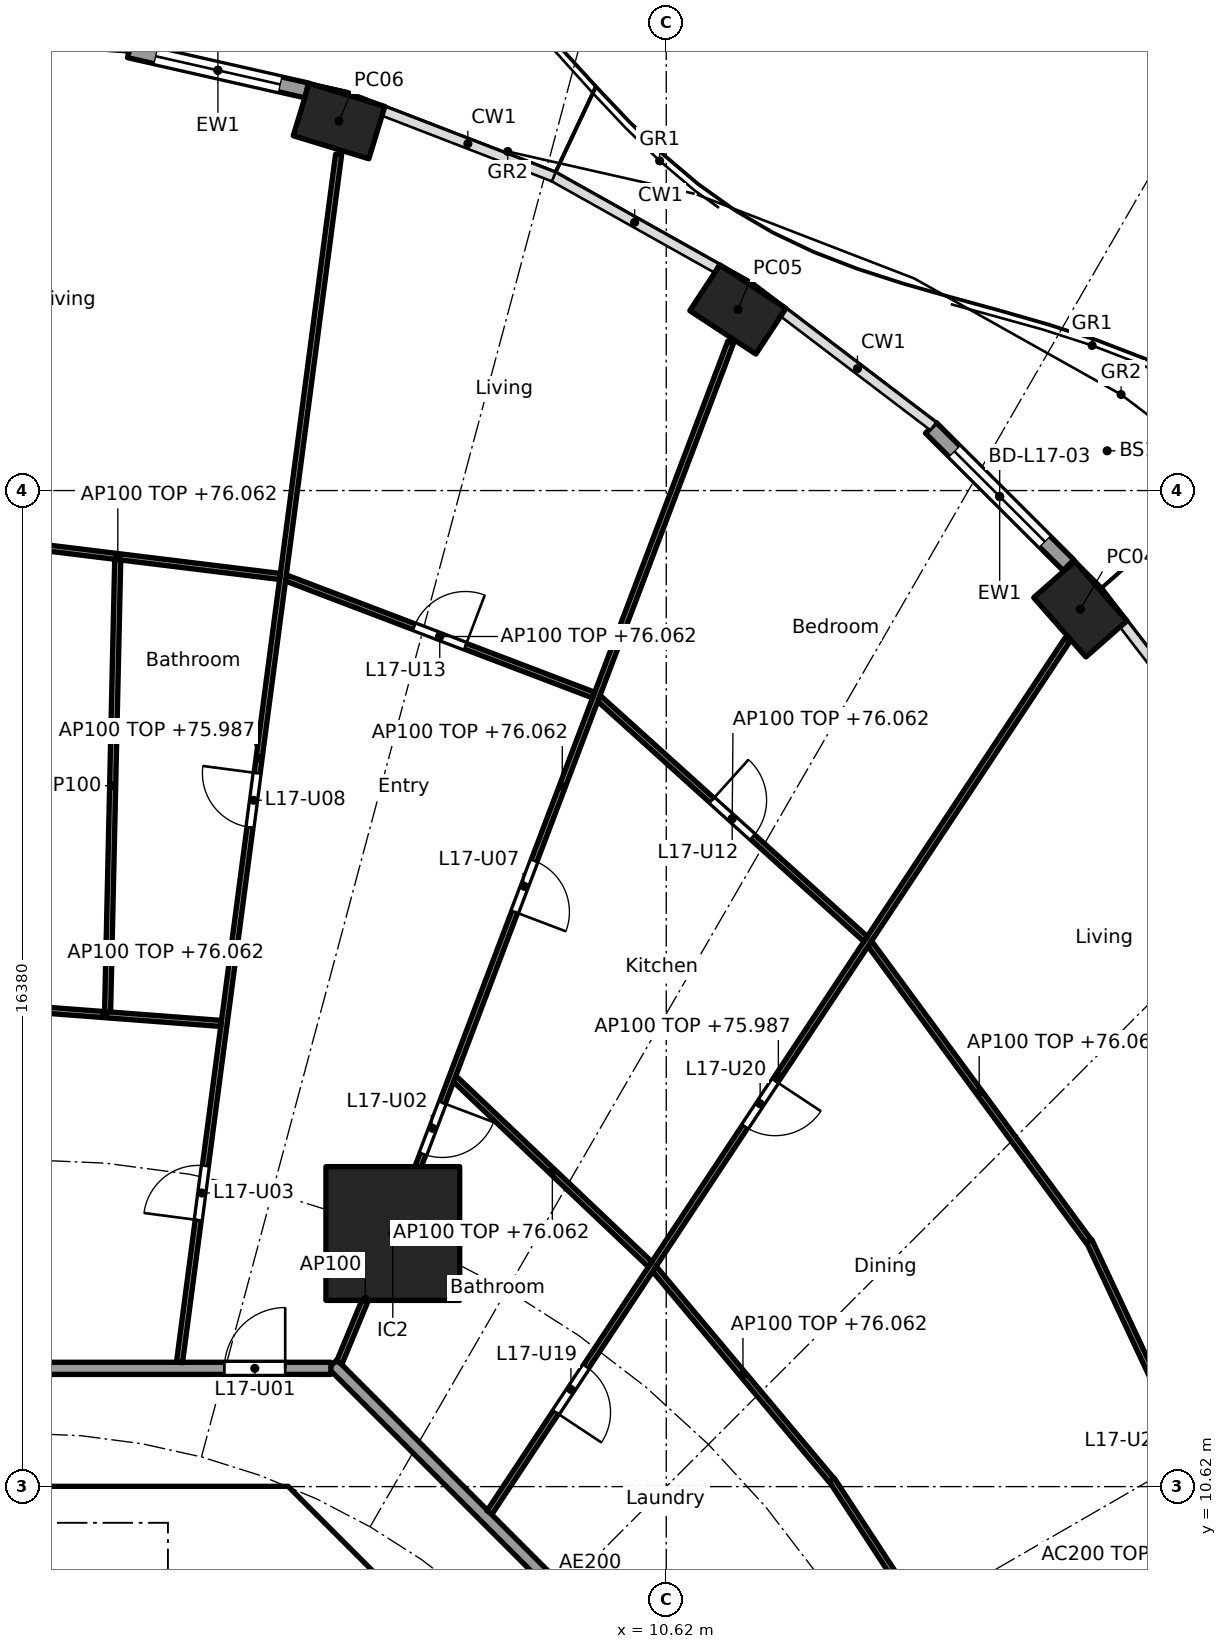
"""IFC4 building model, lengths in metres.
Left out: names, types, materials, properties, quantities, classifications, styles, units other than length and angle.
Written with IfcOpenShell. Run it as: python <this file> out.ifc"""

import sys

from ifc_helpers import new_model, si_unit, direction, frame, frame_2d, origin, origin_2d, place, context, subcontext, project, spatial, polyline, rectangle, hollow_rectangle, outline, extrude, element, fill, save


model = new_model("IFC4")
c1 = context("Model", 3, precision=1e-05, world=origin(), true_north=direction((0.0, 1.0)))
c2 = subcontext(c1, "Body", "Model", "MODEL_VIEW")
j1 = project(units=[si_unit("LENGTHUNIT", "METRE"), si_unit("PLANEANGLEUNIT", "RADIAN")], contexts=[c1])
p1 = place(None, origin())
s1 = spatial("IfcSite", under=j1, at=p1, CompositionType="ELEMENT")
p2 = place(p1, origin())
s2 = spatial("IfcBuilding", under=s1, at=p2, CompositionType="ELEMENT")
p3 = place(p2, frame((0.0, 0.0, 73.3)))
s3 = spatial("IfcBuildingStorey", under=s2, at=p3, CompositionType="ELEMENT", Elevation=73.3)
for number, where, z_axis, x_axis in (
    (1, (17.43, 25.049, -0.26), (0.0, 0.0, 1.0), (-0.66, 0.751, 0.0)),
    (2, (11.798, 29.978, -0.26), (0.0, 0.0, 1.0), (-0.836, 0.549, 0.0)),
    (3, (5.239, 33.076, -0.26), (0.0, 0.0, 1.0), (-0.957, 0.292, 0.0)),
):
    element("IfcColumn", number, at=place(p3, frame(where, z_axis=z_axis, x_axis=x_axis)), inside=s3, PredefinedType="COLUMN", context=c2, shape_type="SweptSolid", body=[
        extrude(hollow_rectangle(XDim=1.3, YDim=0.9, WallThickness=0.045, at=origin_2d()), origin(), (0.0, 0.0, 1.0), 3.96),
    ])
p4 = place(p3, frame((6.123, 14.782, 0.0), z_axis=(0.0, 0.0, 1.0), x_axis=(1.0, 0.0, 0.0)))
e4 = element("IfcColumn", 4, at=p4, inside=s3, PredefinedType="COLUMN", context=c2, shape_type="SweptSolid", body=[
    extrude(rectangle(XDim=2.2, YDim=2.2, at=origin_2d()), origin(), (0.0, 0.0, 1.0), 3.7),
])
p5 = place(p3, frame((14.971, 28.032, 0.0), z_axis=(0.0, 0.0, 1.0), x_axis=(0.707793551437, -0.706419343269, 0.0)))
e5 = element("IfcWall", 5, at=p5, inside=s3, PredefinedType="SOLIDWALL", context=c2, shape_type="SweptSolid", body=[
    extrude(rectangle(XDim=3.198, YDim=0.25, at=frame_2d((1.599, 0.0))), origin(), (0.0, 0.0, 1.0), 3.44),
])
p6 = place(p5, frame((0.549, 0.0, 0.0)))
e6 = element("IfcOpeningElement", 6, at=p6, cuts=e5, PredefinedType="OPENING", context=c2, shape_type="SweptSolid", body=[
    extrude(rectangle(XDim=2.1, YDim=2.4, at=frame_2d((1.05, 1.2))), frame((0.0, 0.135, 0.0), z_axis=(0.0, -1.0, 0.0), x_axis=(1.0, 0.0, 0.0)), (0.0, 0.0, 1.0), 0.27),
])
p7 = place(p3, frame((1.787, 34.241, 0.0), z_axis=(0.0, 0.0, 1.0), x_axis=(0.975317607872, -0.220806620767, 0.0)))
e7 = element("IfcWall", 7, at=p7, inside=s3, PredefinedType="SOLIDWALL", context=c2, shape_type="SweptSolid", body=[
    extrude(rectangle(XDim=2.993, YDim=0.25, at=frame_2d((1.497, 0.0))), origin(), (0.0, 0.0, 1.0), 3.44),
])
p8 = place(p7, frame((0.447, 0.0, 0.0)))
e8 = element("IfcOpeningElement", 8, at=p8, cuts=e7, PredefinedType="OPENING", context=c2, shape_type="SweptSolid", body=[
    extrude(rectangle(XDim=2.1, YDim=2.4, at=frame_2d((1.05, 1.2))), frame((0.0, 0.135, 0.0), z_axis=(0.0, -1.0, 0.0), x_axis=(1.0, 0.0, 0.0)), (0.0, 0.0, 1.0), 0.27),
])
p9 = place(p3, frame((9.988, 4.613, 0.0), z_axis=(0.0, 0.0, 1.0), x_axis=(-0.707106781187, 0.707106781187, 0.0)))
e9 = element("IfcWall", 9, at=p9, inside=s3, PredefinedType="SHEAR", context=c2, shape_type="SweptSolid", body=[
    extrude(rectangle(XDim=7.602, YDim=0.6, at=frame_2d((3.801, 0.0))), origin(), (0.0, 0.0, 1.0), 3.44),
])
p10 = place(p9, frame((3.201, 0.0, 0.0)))
e10 = element("IfcOpeningElement", 10, at=p10, cuts=e9, PredefinedType="OPENING", context=c2, shape_type="SweptSolid", body=[
    extrude(rectangle(XDim=1.2, YDim=2.1, at=frame_2d((0.6, 1.05))), frame((0.0, 0.31, 0.0), z_axis=(0.0, -1.0, 0.0), x_axis=(1.0, 0.0, 0.0)), (0.0, 0.0, 1.0), 0.62),
])
p11 = place(p3, frame((4.0, 7.025, 0.0), z_axis=(0.0, 0.0, 1.0), x_axis=(0.0, 1.0, 0.0)))
e11 = element("IfcWall", 11, at=p11, inside=s3, PredefinedType="SOLIDWALL", context=c2, shape_type="SweptSolid", body=[
    extrude(rectangle(XDim=3.0, YDim=0.2, at=frame_2d((1.5, 0.0))), origin(), (0.0, 0.0, 1.0), 3.44),
])
p12 = place(p11, frame((0.925, 0.0, 0.0)))
e12 = element("IfcOpeningElement", 12, at=p12, cuts=e11, PredefinedType="OPENING", context=c2, shape_type="SweptSolid", body=[
    extrude(rectangle(XDim=1.1, YDim=2.1, at=frame_2d((0.55, 1.05))), frame((0.0, 0.11, 0.0), z_axis=(0.0, -1.0, 0.0), x_axis=(1.0, 0.0, 0.0)), (0.0, 0.0, 1.0), 0.22),
])
p13 = place(p3, origin())
e13 = element("IfcWall", 13, at=p13, inside=s3, PredefinedType="SHEAR", context=c2, shape_type="SweptSolid", body=[
    extrude(outline(polyline([(-4.152, 10.025), (-4.401, 9.776), (-4.825, 10.2), (-4.401, 10.625), (4.401, 10.625), (4.825, 10.2), (4.401, 9.776), (4.152, 10.025), (-4.152, 10.025)])), origin(), (0.0, 0.0, 1.0), 3.44),
])
p14 = place(p3, frame((14.827, 6.146, 0.0), z_axis=(0.0, 0.0, 1.0), x_axis=(0.892068075337, 0.451901038906, 0.0)))
e14 = element("IfcWall", 14, at=p14, inside=s3, PredefinedType="PARTITIONING", context=c2, shape_type="SweptSolid", body=[
    extrude(rectangle(XDim=10.32, YDim=0.2, at=frame_2d((5.16, 0.0))), origin(), (0.0, 0.0, 1.0), 2.762),
])
p15 = place(p3, frame((12.635, 5.134, 0.0), z_axis=(0.0, 0.0, 1.0), x_axis=(-0.707106781187, 0.707106781187, 0.0)))
e15 = element("IfcWall", 15, at=p15, inside=s3, PredefinedType="PARTITIONING", context=c2, shape_type="SweptSolid", body=[
    extrude(rectangle(XDim=10.609, YDim=0.2, at=frame_2d((5.305, 0.0))), origin(), (0.0, 0.0, 1.0), 3.44),
])
p16 = place(p3, frame((5.104, 12.565, 0.0), z_axis=(0.0, 0.0, 1.0), x_axis=(-1.0, 0.0, 0.0)))
e16 = element("IfcWall", 16, at=p16, inside=s3, PredefinedType="PARTITIONING", context=c2, shape_type="SweptSolid", body=[
    extrude(rectangle(XDim=10.409, YDim=0.2, at=frame_2d((5.205, 0.0))), origin(), (0.0, 0.0, 1.0), 3.44),
])
p17 = place(p16, frame((0.751, 0.0, 0.0)))
e17 = element("IfcOpeningElement", 17, at=p17, cuts=e16, PredefinedType="OPENING", context=c2, shape_type="SweptSolid", body=[
    extrude(rectangle(XDim=1.0, YDim=2.1, at=frame_2d((0.5, 1.05))), frame((0.0, 0.11, 0.0), z_axis=(0.0, -1.0, 0.0), x_axis=(1.0, 0.0, 0.0)), (0.0, 0.0, 1.0), 0.22),
])
p18 = place(p3, frame((15.91, 6.806, 0.0), z_axis=(0.0, 0.0, 1.0), x_axis=(-0.547468243486, 0.836826458936, 0.0)))
e18 = element("IfcWall", 18, at=p18, inside=s3, PredefinedType="PARTITIONING", context=c2, shape_type="SweptSolid", body=[
    extrude(rectangle(XDim=4.688, YDim=0.1, at=frame_2d((2.344, 0.0))), origin(), (0.0, 0.0, 1.0), 2.762),
])
p19 = place(p3, frame((20.231, 8.995, 0.0), z_axis=(0.0, 0.0, 1.0), x_axis=(-0.424587886407, 0.905386727712, 0.0)))
e19 = element("IfcWall", 19, at=p19, inside=s3, PredefinedType="PARTITIONING", context=c2, shape_type="SweptSolid", body=[
    extrude(rectangle(XDim=6.254, YDim=0.1, at=frame_2d((3.127, 0.0))), origin(), (0.0, 0.0, 1.0), 2.762),
])
p20 = place(p19, frame((2.652, 0.0, 0.0)))
e20 = element("IfcOpeningElement", 20, at=p20, cuts=e19, PredefinedType="OPENING", context=c2, shape_type="SweptSolid", body=[
    extrude(rectangle(XDim=0.9, YDim=2.1, at=frame_2d((0.45, 1.05))), frame((0.0, 0.06, 0.0), z_axis=(0.0, -1.0, 0.0), x_axis=(1.0, 0.0, 0.0)), (0.0, 0.0, 1.0), 0.12),
])
p21 = place(p3, frame((13.339, 10.725, 0.0), z_axis=(0.0, 0.0, 1.0), x_axis=(-0.642515455924, 0.766272724882, 0.0)))
e21 = element("IfcWall", 21, at=p21, inside=s3, PredefinedType="PARTITIONING", context=c2, shape_type="SweptSolid", body=[
    extrude(rectangle(XDim=4.537, YDim=0.1, at=frame_2d((2.269, 0.0))), origin(), (0.0, 0.0, 1.0), 2.762),
])
p22 = place(p3, frame((17.567, 14.653, 0.0), z_axis=(0.0, 0.0, 1.0), x_axis=(-0.592391983588, 0.80564988536, 0.0)))
e22 = element("IfcWall", 22, at=p22, inside=s3, PredefinedType="PARTITIONING", context=c2, shape_type="SweptSolid", body=[
    extrude(rectangle(XDim=6.08, YDim=0.1, at=frame_2d((3.04, 0.0))), origin(), (0.0, 0.0, 1.0), 2.762),
])
p23 = place(p3, frame((7.713, 10.195, 0.0), z_axis=(0.0, 0.0, 1.0), x_axis=(0.552111071171, 0.833770571015, 0.0)))
e23 = element("IfcWall", 23, at=p23, inside=s3, PredefinedType="PARTITIONING", context=c2, shape_type="SweptSolid", body=[
    extrude(rectangle(XDim=17.208, YDim=0.1, at=frame_2d((8.604, 0.0))), origin(), (0.0, 0.0, 1.0), 2.687),
])
p24 = place(p23, frame((1.976, 0.0, 0.0)))
e24 = element("IfcOpeningElement", 24, at=p24, cuts=e23, PredefinedType="OPENING", context=c2, shape_type="SweptSolid", body=[
    extrude(rectangle(XDim=0.9, YDim=2.1, at=frame_2d((0.45, 1.05))), frame((0.0, 0.06, 0.0), z_axis=(0.0, -1.0, 0.0), x_axis=(1.0, 0.0, 0.0)), (0.0, 0.0, 1.0), 0.12),
])
p25 = place(p23, frame((7.611, 0.0, 0.0)))
e25 = element("IfcOpeningElement", 25, at=p25, cuts=e23, PredefinedType="OPENING", context=c2, shape_type="SweptSolid", body=[
    extrude(rectangle(XDim=0.9, YDim=2.1, at=frame_2d((0.45, 1.05))), frame((0.0, 0.06, 0.0), z_axis=(0.0, -1.0, 0.0), x_axis=(1.0, 0.0, 0.0)), (0.0, 0.0, 1.0), 0.12),
])
p26 = place(p3, frame((10.355, 14.274, 0.0), z_axis=(0.0, 0.0, 1.0), x_axis=(-0.725219204328, 0.688518050361, 0.0)))
e26 = element("IfcWall", 26, at=p26, inside=s3, PredefinedType="PARTITIONING", context=c2, shape_type="SweptSolid", body=[
    extrude(rectangle(XDim=4.437, YDim=0.1, at=frame_2d((2.219, 0.0))), origin(), (0.0, 0.0, 1.0), 2.762),
])
p27 = place(p3, frame((13.898, 19.625, 0.0), z_axis=(0.0, 0.0, 1.0), x_axis=(-0.742400132046, 0.669956747812, 0.0)))
e27 = element("IfcWall", 27, at=p27, inside=s3, PredefinedType="PARTITIONING", context=c2, shape_type="SweptSolid", body=[
    extrude(rectangle(XDim=5.911, YDim=0.1, at=frame_2d((2.956, 0.0))), origin(), (0.0, 0.0, 1.0), 2.762),
])
p28 = place(p27, frame((2.506, 0.0, 0.0)))
e28 = element("IfcOpeningElement", 28, at=p28, cuts=e27, PredefinedType="OPENING", context=c2, shape_type="SweptSolid", body=[
    extrude(rectangle(XDim=0.9, YDim=2.1, at=frame_2d((0.45, 1.05))), frame((0.0, 0.06, 0.0), z_axis=(0.0, -1.0, 0.0), x_axis=(1.0, 0.0, 0.0)), (0.0, 0.0, 1.0), 0.12),
])
p29 = place(p3, frame((5.243, 12.657, 0.0), z_axis=(0.0, 0.0, 1.0), x_axis=(0.382719158442, 0.923864733477, 0.0)))
e29 = element("IfcWall", 29, at=p29, inside=s3, PredefinedType="PARTITIONING", context=c2, shape_type="SweptSolid", body=[
    extrude(rectangle(XDim=2.25, YDim=0.1, at=frame_2d((1.125, 0.0))), origin(), (0.0, 0.0, 1.0), 3.44),
])
p30 = place(p3, frame((6.141, 14.829, 0.0), z_axis=(0.0, 0.0, 1.0), x_axis=(0.354477134193, 0.935064682968, 0.0)))
e30 = element("IfcWall", 30, at=p30, inside=s3, PredefinedType="PARTITIONING", context=c2, shape_type="SweptSolid", body=[
    extrude(rectangle(XDim=15.626, YDim=0.1, at=frame_2d((7.813, 0.0))), origin(), (0.0, 0.0, 1.0), 2.762),
])
p31 = place(p30, frame((1.35, 0.0, 0.0)))
e31 = element("IfcOpeningElement", 31, at=p31, cuts=e30, PredefinedType="OPENING", context=c2, shape_type="SweptSolid", body=[
    extrude(rectangle(XDim=0.9, YDim=2.1, at=frame_2d((0.45, 1.05))), frame((0.0, 0.06, 0.0), z_axis=(0.0, -1.0, 0.0), x_axis=(1.0, 0.0, 0.0)), (0.0, 0.0, 1.0), 0.12),
])
p32 = place(p30, frame((5.606, 0.0, 0.0)))
e32 = element("IfcOpeningElement", 32, at=p32, cuts=e30, PredefinedType="OPENING", context=c2, shape_type="SweptSolid", body=[
    extrude(rectangle(XDim=0.9, YDim=2.1, at=frame_2d((0.45, 1.05))), frame((0.0, 0.06, 0.0), z_axis=(0.0, -1.0, 0.0), x_axis=(1.0, 0.0, 0.0)), (0.0, 0.0, 1.0), 0.12),
])
p33 = place(p3, frame((9.426, 23.637, 0.0), z_axis=(0.0, 0.0, 1.0), x_axis=(-0.93461405629, 0.355663557011, 0.0)))
e33 = element("IfcWall", 33, at=p33, inside=s3, PredefinedType="PARTITIONING", context=c2, shape_type="SweptSolid", body=[
    extrude(rectangle(XDim=5.417, YDim=0.1, at=frame_2d((2.708, 0.0))), origin(), (0.0, 0.0, 1.0), 2.762),
])
p34 = place(p33, frame((2.258, 0.0, 0.0)))
e34 = element("IfcOpeningElement", 34, at=p34, cuts=e33, PredefinedType="OPENING", context=c2, shape_type="SweptSolid", body=[
    extrude(rectangle(XDim=0.9, YDim=2.1, at=frame_2d((0.45, 1.05))), frame((0.0, 0.06, 0.0), z_axis=(0.0, -1.0, 0.0), x_axis=(1.0, 0.0, 0.0)), (0.0, 0.0, 1.0), 0.12),
])
p35 = place(p3, frame((2.615, 12.664, 0.0), z_axis=(0.0, 0.0, 1.0), x_axis=(0.130614967904, 0.99143316979, 0.0)))
e35 = element("IfcWall", 35, at=p35, inside=s3, PredefinedType="PARTITIONING", context=c2, shape_type="SweptSolid", body=[
    extrude(rectangle(XDim=20.034, YDim=0.1, at=frame_2d((10.017, 0.0))), origin(), (0.0, 0.0, 1.0), 2.687),
])
p36 = place(p35, frame((2.359, 0.0, 0.0)))
e36 = element("IfcOpeningElement", 36, at=p36, cuts=e35, PredefinedType="OPENING", context=c2, shape_type="SweptSolid", body=[
    extrude(rectangle(XDim=0.9, YDim=2.1, at=frame_2d((0.45, 1.05))), frame((0.0, 0.06, 0.0), z_axis=(0.0, -1.0, 0.0), x_axis=(1.0, 0.0, 0.0)), (0.0, 0.0, 1.0), 0.12),
])
p37 = place(p35, frame((8.873, 0.0, 0.0)))
e37 = element("IfcOpeningElement", 37, at=p37, cuts=e35, PredefinedType="OPENING", context=c2, shape_type="SweptSolid", body=[
    extrude(rectangle(XDim=0.9, YDim=2.1, at=frame_2d((0.45, 1.05))), frame((0.0, 0.06, 0.0), z_axis=(0.0, -1.0, 0.0), x_axis=(1.0, 0.0, 0.0)), (0.0, 0.0, 1.0), 0.12),
])
p38 = place(p3, frame((3.299, 18.237, 0.0), z_axis=(0.0, 0.0, 1.0), x_axis=(-0.997152243414, 0.075414875552, 0.0)))
e38 = element("IfcWall", 38, at=p38, inside=s3, PredefinedType="PARTITIONING", context=c2, shape_type="SweptSolid", body=[
    extrude(rectangle(XDim=3.846, YDim=0.1, at=frame_2d((1.923, 0.0))), origin(), (0.0, 0.0, 1.0), 2.762),
])
p39 = place(p3, frame((4.267, 25.587, 0.0), z_axis=(0.0, 0.0, 1.0), x_axis=(-0.992576206119, 0.121624319302, 0.0)))
e39 = element("IfcWall", 39, at=p39, inside=s3, PredefinedType="PARTITIONING", context=c2, shape_type="SweptSolid", body=[
    extrude(rectangle(XDim=5.374, YDim=0.1, at=frame_2d((2.687, 0.0))), origin(), (0.0, 0.0, 1.0), 2.762),
])
p40 = place(p3, frame((1.433, 18.428, 0.0), z_axis=(0.0, 0.0, 1.0), x_axis=(0.022419421812, 0.999748653175, 0.0)))
e40 = element("IfcWall", 40, at=p40, inside=s3, PredefinedType="PARTITIONING", context=c2, shape_type="SweptSolid", body=[
    extrude(rectangle(XDim=7.438, YDim=0.1, at=frame_2d((3.719, 0.0))), origin(), (0.0, 0.0, 1.0), 3.44),
])
p41 = place(p6, origin())
e41 = element("IfcDoor", 41, at=p41, inside=s3, OperationType="SLIDING_TO_LEFT", PredefinedType="DOOR", context=c2, shape_type="SweptSolid", body=[
    extrude(rectangle(XDim=2.1, YDim=2.4, at=frame_2d((1.05, 1.2))), frame((0.0, 0.025, 0.0), z_axis=(0.0, -1.0, 0.0), x_axis=(1.0, 0.0, 0.0)), (0.0, 0.0, 1.0), 0.05),
])
fill(e6, e41)
p42 = place(p8, origin())
e42 = element("IfcDoor", 42, at=p42, inside=s3, OperationType="SLIDING_TO_LEFT", PredefinedType="DOOR", context=c2, shape_type="SweptSolid", body=[
    extrude(rectangle(XDim=2.1, YDim=2.4, at=frame_2d((1.05, 1.2))), frame((0.0, 0.025, 0.0), z_axis=(0.0, -1.0, 0.0), x_axis=(1.0, 0.0, 0.0)), (0.0, 0.0, 1.0), 0.05),
])
fill(e8, e42)
p43 = place(p17, frame((1.0, 0.0, 0.0), x_axis=(-1.0, 0.0, 0.0)))
e43 = element("IfcDoor", 43, at=p43, inside=s3, OperationType="SINGLE_SWING_RIGHT", PredefinedType="DOOR", context=c2, shape_type="SweptSolid", body=[
    extrude(rectangle(XDim=1.0, YDim=2.1, at=frame_2d((0.5, 1.05))), frame((0.0, 0.025, 0.0), z_axis=(0.0, -1.0, 0.0), x_axis=(1.0, 0.0, 0.0)), (0.0, 0.0, 1.0), 0.05),
])
fill(e17, e43)
p44 = place(p31, frame((0.9, 0.0, 0.0), x_axis=(-1.0, 0.0, 0.0)))
e44 = element("IfcDoor", 44, at=p44, inside=s3, OperationType="SINGLE_SWING_LEFT", PredefinedType="DOOR", context=c2, shape_type="SweptSolid", body=[
    extrude(rectangle(XDim=0.9, YDim=2.1, at=frame_2d((0.45, 1.05))), frame((0.0, 0.025, 0.0), z_axis=(0.0, -1.0, 0.0), x_axis=(1.0, 0.0, 0.0)), (0.0, 0.0, 1.0), 0.05),
])
fill(e31, e44)
p45 = place(p36, origin())
e45 = element("IfcDoor", 45, at=p45, inside=s3, OperationType="SINGLE_SWING_LEFT", PredefinedType="DOOR", context=c2, shape_type="SweptSolid", body=[
    extrude(rectangle(XDim=0.9, YDim=2.1, at=frame_2d((0.45, 1.05))), frame((0.0, 0.025, 0.0), z_axis=(0.0, -1.0, 0.0), x_axis=(1.0, 0.0, 0.0)), (0.0, 0.0, 1.0), 0.05),
])
fill(e36, e45)
p46 = place(p32, frame((0.9, 0.0, 0.0), x_axis=(-1.0, 0.0, 0.0)))
e46 = element("IfcDoor", 46, at=p46, inside=s3, OperationType="SINGLE_SWING_RIGHT", PredefinedType="DOOR", context=c2, shape_type="SweptSolid", body=[
    extrude(rectangle(XDim=0.9, YDim=2.1, at=frame_2d((0.45, 1.05))), frame((0.0, 0.025, 0.0), z_axis=(0.0, -1.0, 0.0), x_axis=(1.0, 0.0, 0.0)), (0.0, 0.0, 1.0), 0.05),
])
fill(e32, e46)
p47 = place(p37, origin())
e47 = element("IfcDoor", 47, at=p47, inside=s3, OperationType="SINGLE_SWING_RIGHT", PredefinedType="DOOR", context=c2, shape_type="SweptSolid", body=[
    extrude(rectangle(XDim=0.9, YDim=2.1, at=frame_2d((0.45, 1.05))), frame((0.0, 0.025, 0.0), z_axis=(0.0, -1.0, 0.0), x_axis=(1.0, 0.0, 0.0)), (0.0, 0.0, 1.0), 0.05),
])
fill(e37, e47)
p48 = place(p28, frame((0.9, 0.0, 0.0), x_axis=(-1.0, 0.0, 0.0)))
e48 = element("IfcDoor", 48, at=p48, inside=s3, OperationType="SINGLE_SWING_LEFT", PredefinedType="DOOR", context=c2, shape_type="SweptSolid", body=[
    extrude(rectangle(XDim=0.9, YDim=2.1, at=frame_2d((0.45, 1.05))), frame((0.0, 0.025, 0.0), z_axis=(0.0, -1.0, 0.0), x_axis=(1.0, 0.0, 0.0)), (0.0, 0.0, 1.0), 0.05),
])
fill(e28, e48)
p49 = place(p34, frame((0.9, 0.0, 0.0), x_axis=(-1.0, 0.0, 0.0)))
e49 = element("IfcDoor", 49, at=p49, inside=s3, OperationType="SINGLE_SWING_RIGHT", PredefinedType="DOOR", context=c2, shape_type="SweptSolid", body=[
    extrude(rectangle(XDim=0.9, YDim=2.1, at=frame_2d((0.45, 1.05))), frame((0.0, 0.025, 0.0), z_axis=(0.0, -1.0, 0.0), x_axis=(1.0, 0.0, 0.0)), (0.0, 0.0, 1.0), 0.05),
])
fill(e34, e49)
p50 = place(p24, frame((0.9, 0.0, 0.0), x_axis=(-1.0, 0.0, 0.0)))
e50 = element("IfcDoor", 50, at=p50, inside=s3, OperationType="SINGLE_SWING_RIGHT", PredefinedType="DOOR", context=c2, shape_type="SweptSolid", body=[
    extrude(rectangle(XDim=0.9, YDim=2.1, at=frame_2d((0.45, 1.05))), frame((0.0, 0.025, 0.0), z_axis=(0.0, -1.0, 0.0), x_axis=(1.0, 0.0, 0.0)), (0.0, 0.0, 1.0), 0.05),
])
fill(e24, e50)
p51 = place(p25, frame((0.9, 0.0, 0.0), x_axis=(-1.0, 0.0, 0.0)))
e51 = element("IfcDoor", 51, at=p51, inside=s3, OperationType="SINGLE_SWING_LEFT", PredefinedType="DOOR", context=c2, shape_type="SweptSolid", body=[
    extrude(rectangle(XDim=0.9, YDim=2.1, at=frame_2d((0.45, 1.05))), frame((0.0, 0.025, 0.0), z_axis=(0.0, -1.0, 0.0), x_axis=(1.0, 0.0, 0.0)), (0.0, 0.0, 1.0), 0.05),
])
fill(e25, e51)
save(model, sys.argv[1])
